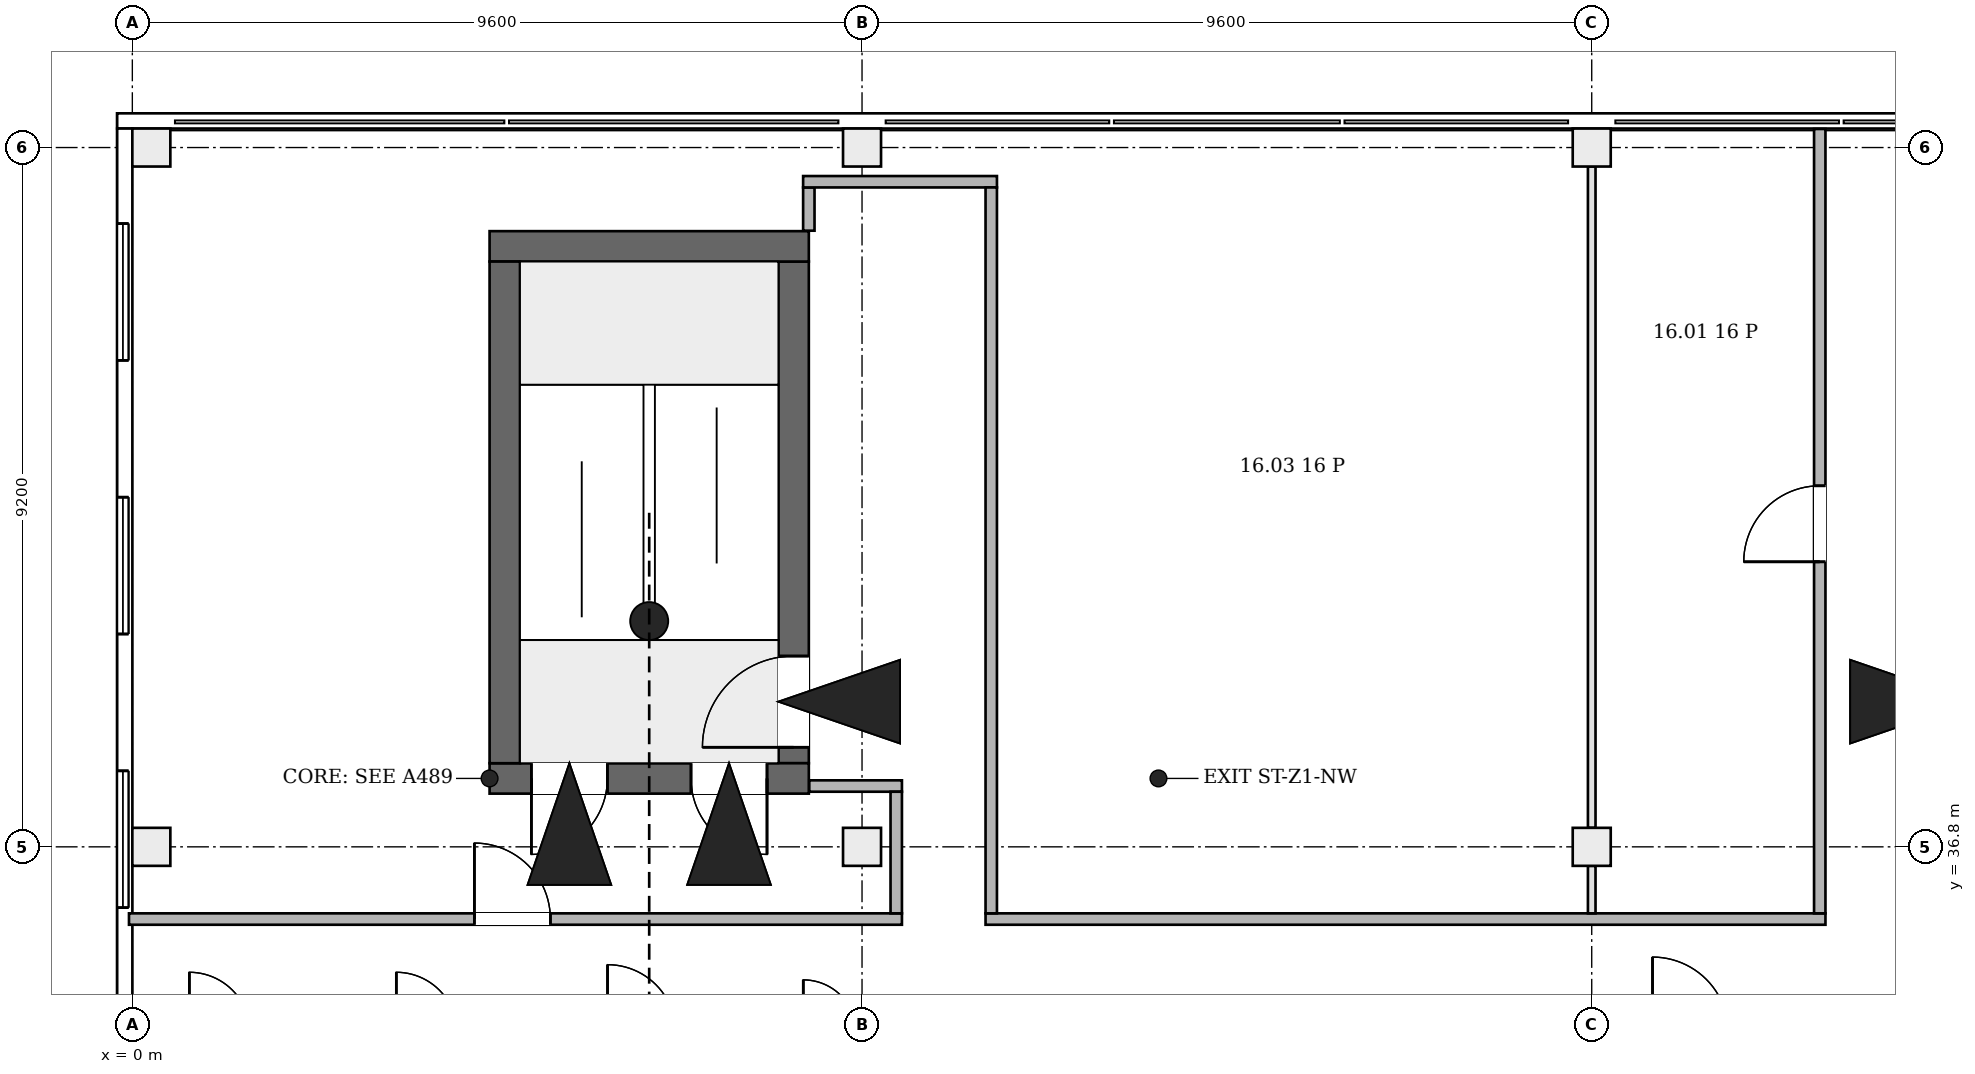
"""IFC4 building model, lengths in metres.
Left out: names, types, materials, properties, quantities, classifications, styles, units other than length and angle.
Written with IfcOpenShell. Run it as: python <this file> out.ifc"""

import sys

from ifc_helpers import new_model, si_unit, direction, frame, frame_2d, origin, origin_2d, place, context, subcontext, project, spatial, rectangle, extrude, element, fill, save


model = new_model("IFC4")
c1 = context("Model", 3, precision=1e-05, world=origin(), true_north=direction((0.0, 1.0)))
c2 = subcontext(c1, "Body", "Model", "MODEL_VIEW")
j1 = project(units=[si_unit("LENGTHUNIT", "METRE"), si_unit("PLANEANGLEUNIT", "RADIAN")], contexts=[c1])
p1 = place(None, origin())
s1 = spatial("IfcSite", under=j1, at=p1, CompositionType="ELEMENT")
p2 = place(p1, origin())
s2 = spatial("IfcBuilding", under=s1, at=p2, CompositionType="ELEMENT")
p3 = place(p2, frame((0.0, 0.0, 78.1)))
s3 = spatial("IfcBuildingStorey", under=s2, at=p3, CompositionType="ELEMENT", Elevation=78.1)
p4 = place(p3, frame((4.7, 37.7, 0.0), z_axis=(0.0, 0.0, 1.0), x_axis=(1.0, 0.0, 0.0)))
e1 = element("IfcWall", 1, at=p4, inside=s3, PredefinedType="SHEAR", context=c2, shape_type="SweptSolid", body=[
    extrude(rectangle(XDim=4.2, YDim=0.4, at=frame_2d((2.1, 0.0))), origin(), (0.0, 0.0, 1.0), 7.1),
])
p5 = place(p4, frame((0.55, 0.0, 4.2)))
e2 = element("IfcOpeningElement", 2, at=p5, cuts=e1, PredefinedType="OPENING", context=c2, shape_type="SweptSolid", body=[
    extrude(rectangle(XDim=1.0, YDim=2.1, at=frame_2d((0.5, 1.05))), frame((0.0, 0.21, 0.0), z_axis=(0.0, -1.0, 0.0), x_axis=(1.0, 0.0, 0.0)), (0.0, 0.0, 1.0), 0.42),
])
p6 = place(p4, frame((2.65, 0.0, 4.2)))
e3 = element("IfcOpeningElement", 3, at=p6, cuts=e1, PredefinedType="OPENING", context=c2, shape_type="SweptSolid", body=[
    extrude(rectangle(XDim=1.0, YDim=2.1, at=frame_2d((0.5, 1.05))), frame((0.0, 0.21, 0.0), z_axis=(0.0, -1.0, 0.0), x_axis=(1.0, 0.0, 0.0)), (0.0, 0.0, 1.0), 0.42),
])
p7 = place(p3, frame((4.7, 44.7, 0.0), z_axis=(0.0, 0.0, 1.0), x_axis=(1.0, 0.0, 0.0)))
e4 = element("IfcWall", 4, at=p7, inside=s3, PredefinedType="SHEAR", context=c2, shape_type="SweptSolid", body=[
    extrude(rectangle(XDim=4.2, YDim=0.4, at=frame_2d((2.1, 0.0))), origin(), (0.0, 0.0, 1.0), 7.1),
])
p8 = place(p3, frame((4.9, 37.9, 0.0), z_axis=(0.0, 0.0, 1.0), x_axis=(0.0, 1.0, 0.0)))
e5 = element("IfcWall", 5, at=p8, inside=s3, PredefinedType="SHEAR", context=c2, shape_type="SweptSolid", body=[
    extrude(rectangle(XDim=6.6, YDim=0.4, at=frame_2d((3.3, 0.0))), origin(), (0.0, 0.0, 1.0), 7.1),
])
p9 = place(p3, frame((8.7, 37.9, 0.0), z_axis=(0.0, 0.0, 1.0), x_axis=(0.0, 1.0, 0.0)))
e6 = element("IfcWall", 6, at=p9, inside=s3, PredefinedType="SHEAR", context=c2, shape_type="SweptSolid", body=[
    extrude(rectangle(XDim=6.6, YDim=0.4, at=frame_2d((3.3, 0.0))), origin(), (0.0, 0.0, 1.0), 7.1),
])
p10 = place(p9, frame((0.21, 0.0, 0.0)))
e7 = element("IfcOpeningElement", 7, at=p10, cuts=e6, PredefinedType="OPENING", context=c2, shape_type="SweptSolid", body=[
    extrude(rectangle(XDim=1.2, YDim=2.1, at=frame_2d((0.6, 1.05))), frame((0.0, 0.21, 0.0), z_axis=(0.0, -1.0, 0.0), x_axis=(1.0, 0.0, 0.0)), (0.0, 0.0, 1.0), 0.42),
])
for number, where, z_axis, x_axis in (
    (8, (0.25, 36.8, 0.0), (0.0, 0.0, 1.0), (1.0, 0.0, 0.0)),
    (9, (9.6, 36.8, 0.0), (0.0, 0.0, 1.0), (1.0, 0.0, 0.0)),
    (10, (19.2, 36.8, 0.0), (0.0, 0.0, 1.0), (1.0, 0.0, 0.0)),
    (11, (0.25, 46.0, 0.0), (0.0, 0.0, 1.0), (1.0, 0.0, 0.0)),
    (12, (9.6, 46.0, 0.0), (0.0, 0.0, 1.0), (1.0, 0.0, 0.0)),
    (13, (19.2, 46.0, 0.0), (0.0, 0.0, 1.0), (1.0, 0.0, 0.0)),
):
    element("IfcColumn", number, at=place(p3, frame(where, z_axis=z_axis, x_axis=x_axis)), inside=s3, PredefinedType="COLUMN", context=c2, shape_type="SweptSolid", body=[
        extrude(rectangle(XDim=0.5, YDim=0.5, at=origin_2d()), origin(), (0.0, 0.0, 1.0), 3.9),
    ])
p11 = place(p3, frame((-0.125, 46.45, 0.0), z_axis=(0.0, 0.0, 1.0), x_axis=(0.0, -1.0, 0.0)))
e14 = element("IfcWall", 14, at=p11, inside=s3, PredefinedType="ELEMENTEDWALL", context=c2, shape_type="SweptSolid", body=[
    extrude(rectangle(XDim=19.3, YDim=0.15, at=frame_2d((9.65, 0.0))), origin(), (0.0, 0.0, 1.0), 3.9),
])
p12 = place(p11, frame((15.85, 0.0, 0.9)))
e15 = element("IfcOpeningElement", 15, at=p12, cuts=e14, PredefinedType="OPENING", context=c2, shape_type="SweptSolid", body=[
    extrude(rectangle(XDim=1.8, YDim=2.6, at=frame_2d((0.9, 1.3))), frame((0.0, 0.085, 0.0), z_axis=(0.0, -1.0, 0.0), x_axis=(1.0, 0.0, 0.0)), (0.0, 0.0, 1.0), 0.17),
])
p13 = place(p11, frame((12.25, 0.0, 0.9)))
e16 = element("IfcOpeningElement", 16, at=p13, cuts=e14, PredefinedType="OPENING", context=c2, shape_type="SweptSolid", body=[
    extrude(rectangle(XDim=1.8, YDim=2.6, at=frame_2d((0.9, 1.3))), frame((0.0, 0.085, 0.0), z_axis=(0.0, -1.0, 0.0), x_axis=(1.0, 0.0, 0.0)), (0.0, 0.0, 1.0), 0.17),
])
p14 = place(p11, frame((8.65, 0.0, 0.9)))
e17 = element("IfcOpeningElement", 17, at=p14, cuts=e14, PredefinedType="OPENING", context=c2, shape_type="SweptSolid", body=[
    extrude(rectangle(XDim=1.8, YDim=2.6, at=frame_2d((0.9, 1.3))), frame((0.0, 0.085, 0.0), z_axis=(0.0, -1.0, 0.0), x_axis=(1.0, 0.0, 0.0)), (0.0, 0.0, 1.0), 0.17),
])
p15 = place(p11, frame((5.05, 0.0, 0.9)))
e18 = element("IfcOpeningElement", 18, at=p15, cuts=e14, PredefinedType="OPENING", context=c2, shape_type="SweptSolid", body=[
    extrude(rectangle(XDim=1.8, YDim=2.6, at=frame_2d((0.9, 1.3))), frame((0.0, 0.085, 0.0), z_axis=(0.0, -1.0, 0.0), x_axis=(1.0, 0.0, 0.0)), (0.0, 0.0, 1.0), 0.17),
])
p16 = place(p11, frame((1.45, 0.0, 0.9)))
e19 = element("IfcOpeningElement", 19, at=p16, cuts=e14, PredefinedType="OPENING", context=c2, shape_type="SweptSolid", body=[
    extrude(rectangle(XDim=1.8, YDim=2.6, at=frame_2d((0.9, 1.3))), frame((0.0, 0.085, 0.0), z_axis=(0.0, -1.0, 0.0), x_axis=(1.0, 0.0, 0.0)), (0.0, 0.0, 1.0), 0.17),
])
p17 = place(p3, frame((38.851, 46.35, 4.2), z_axis=(0.0, 0.0, 1.0), x_axis=(-1.0, 0.0, 0.0)))
e20 = element("IfcWall", 20, at=p17, inside=s3, PredefinedType="PARAPET", context=c2, shape_type="SweptSolid", body=[
    extrude(rectangle(XDim=39.05, YDim=0.2, at=frame_2d((19.525, 0.0))), origin(), (0.0, 0.0, 1.0), 1.1),
])
p18 = place(p3, frame((-0.099, 46.25, 4.2), z_axis=(0.0, 0.0, 1.0), x_axis=(0.0, -1.0, 0.0)))
e21 = element("IfcWall", 21, at=p18, inside=s3, PredefinedType="PARAPET", context=c2, shape_type="SweptSolid", body=[
    extrude(rectangle(XDim=18.9, YDim=0.2, at=frame_2d((9.45, 0.0))), origin(), (0.0, 0.0, 1.0), 1.1),
])
p19 = place(p3, frame((-0.044, 35.85, 0.0), z_axis=(0.0, 0.0, 1.0), x_axis=(1.0, 0.0, 0.0)))
e22 = element("IfcWall", 22, at=p19, inside=s3, PredefinedType="PARTITIONING", context=c2, shape_type="SweptSolid", body=[
    extrude(rectangle(XDim=10.169, YDim=0.15, at=frame_2d((5.084, 0.0))), origin(), (0.0, 0.0, 1.0), 3.9),
])
p20 = place(p19, frame((4.544, 0.0, 0.0)))
e23 = element("IfcOpeningElement", 23, at=p20, cuts=e22, PredefinedType="OPENING", context=c2, shape_type="SweptSolid", body=[
    extrude(rectangle(XDim=1.0, YDim=2.1, at=frame_2d((0.5, 1.05))), frame((0.0, 0.085, 0.0), z_axis=(0.0, -1.0, 0.0), x_axis=(1.0, 0.0, 0.0)), (0.0, 0.0, 1.0), 0.17),
])
p21 = place(p3, frame((8.9, 44.906, 0.0), z_axis=(0.0, 0.0, 1.0), x_axis=(0.0, 1.0, 0.0)))
e24 = element("IfcWall", 24, at=p21, inside=s3, PredefinedType="PARTITIONING", context=c2, shape_type="SweptSolid", body=[
    extrude(rectangle(XDim=0.569, YDim=0.15, at=frame_2d((0.285, 0.0))), origin(), (0.0, 0.0, 1.0), 3.9),
])
p22 = place(p3, frame((8.825, 45.55, 0.0), z_axis=(0.0, 0.0, 1.0), x_axis=(1.0, 0.0, 0.0)))
e25 = element("IfcWall", 25, at=p22, inside=s3, PredefinedType="PARTITIONING", context=c2, shape_type="SweptSolid", body=[
    extrude(rectangle(XDim=2.55, YDim=0.15, at=frame_2d((1.275, 0.0))), origin(), (0.0, 0.0, 1.0), 3.9),
])
p23 = place(p3, frame((8.906, 37.6, 0.0), z_axis=(0.0, 0.0, 1.0), x_axis=(1.0, 0.0, 0.0)))
e26 = element("IfcWall", 26, at=p23, inside=s3, PredefinedType="PARTITIONING", context=c2, shape_type="SweptSolid", body=[
    extrude(rectangle(XDim=1.219, YDim=0.15, at=frame_2d((0.609, 0.0))), origin(), (0.0, 0.0, 1.0), 3.9),
])
p24 = place(p3, frame((10.05, 35.925, 0.0), z_axis=(0.0, 0.0, 1.0), x_axis=(0.0, 1.0, 0.0)))
e27 = element("IfcWall", 27, at=p24, inside=s3, PredefinedType="PARTITIONING", context=c2, shape_type="SweptSolid", body=[
    extrude(rectangle(XDim=1.6, YDim=0.15, at=frame_2d((0.8, 0.0))), origin(), (0.0, 0.0, 1.0), 3.9),
])
p25 = place(p3, frame((11.225, 35.85, 0.0), z_axis=(0.0, 0.0, 1.0), x_axis=(1.0, 0.0, 0.0)))
e28 = element("IfcWall", 28, at=p25, inside=s3, PredefinedType="PARTITIONING", context=c2, shape_type="SweptSolid", body=[
    extrude(rectangle(XDim=11.05, YDim=0.15, at=frame_2d((5.525, 0.0))), origin(), (0.0, 0.0, 1.0), 3.9),
])
p26 = place(p3, frame((11.3, 35.925, 0.0), z_axis=(0.0, 0.0, 1.0), x_axis=(0.0, 1.0, 0.0)))
e29 = element("IfcWall", 29, at=p26, inside=s3, PredefinedType="PARTITIONING", context=c2, shape_type="SweptSolid", body=[
    extrude(rectangle(XDim=9.55, YDim=0.15, at=frame_2d((4.775, 0.0))), origin(), (0.0, 0.0, 1.0), 3.9),
])
p27 = place(p3, frame((19.2, 35.925, 0.0), z_axis=(0.0, 0.0, 1.0), x_axis=(0.0, 1.0, 0.0)))
e30 = element("IfcWall", 30, at=p27, inside=s3, PredefinedType="PARTITIONING", context=c2, shape_type="SweptSolid", body=[
    extrude(rectangle(XDim=0.625, YDim=0.1, at=frame_2d((0.312, 0.0))), origin(), (0.0, 0.0, 1.0), 3.9),
])
p28 = place(p3, frame((19.2, 37.05, 0.0), z_axis=(0.0, 0.0, 1.0), x_axis=(0.0, 1.0, 0.0)))
e31 = element("IfcWall", 31, at=p28, inside=s3, PredefinedType="PARTITIONING", context=c2, shape_type="SweptSolid", body=[
    extrude(rectangle(XDim=8.7, YDim=0.1, at=frame_2d((4.35, 0.0))), origin(), (0.0, 0.0, 1.0), 3.9),
])
p29 = place(p3, frame((22.2, 35.925, 0.0), z_axis=(0.0, 0.0, 1.0), x_axis=(0.0, 1.0, 0.0)))
e32 = element("IfcWall", 32, at=p29, inside=s3, PredefinedType="PARTITIONING", context=c2, shape_type="SweptSolid", body=[
    extrude(rectangle(XDim=10.319, YDim=0.15, at=frame_2d((5.159, 0.0))), origin(), (0.0, 0.0, 1.0), 3.9),
])
p30 = place(p29, frame((4.625, 0.0, 0.0)))
e33 = element("IfcOpeningElement", 33, at=p30, cuts=e32, PredefinedType="OPENING", context=c2, shape_type="SweptSolid", body=[
    extrude(rectangle(XDim=1.0, YDim=2.1, at=frame_2d((0.5, 1.05))), frame((0.0, 0.085, 0.0), z_axis=(0.0, -1.0, 0.0), x_axis=(1.0, 0.0, 0.0)), (0.0, 0.0, 1.0), 0.17),
])
p31 = place(p14, origin())
e34 = element("IfcWindow", 34, at=p31, inside=s3, PartitioningType="SINGLE_PANEL", PredefinedType="WINDOW", context=c2, shape_type="SweptSolid", body=[
    extrude(rectangle(XDim=1.8, YDim=2.6, at=frame_2d((0.9, 1.3))), frame((0.0, 0.03, 0.0), z_axis=(0.0, -1.0, 0.0), x_axis=(1.0, 0.0, 0.0)), (0.0, 0.0, 1.0), 0.06),
])
fill(e17, e34)
p32 = place(p15, origin())
e35 = element("IfcWindow", 35, at=p32, inside=s3, PartitioningType="SINGLE_PANEL", PredefinedType="WINDOW", context=c2, shape_type="SweptSolid", body=[
    extrude(rectangle(XDim=1.8, YDim=2.6, at=frame_2d((0.9, 1.3))), frame((0.0, 0.03, 0.0), z_axis=(0.0, -1.0, 0.0), x_axis=(1.0, 0.0, 0.0)), (0.0, 0.0, 1.0), 0.06),
])
fill(e18, e35)
p33 = place(p16, origin())
e36 = element("IfcWindow", 36, at=p33, inside=s3, PartitioningType="SINGLE_PANEL", PredefinedType="WINDOW", context=c2, shape_type="SweptSolid", body=[
    extrude(rectangle(XDim=1.8, YDim=2.6, at=frame_2d((0.9, 1.3))), frame((0.0, 0.03, 0.0), z_axis=(0.0, -1.0, 0.0), x_axis=(1.0, 0.0, 0.0)), (0.0, 0.0, 1.0), 0.06),
])
fill(e19, e36)
p34 = place(p10, origin())
e37 = element("IfcDoor", 37, at=p34, inside=s3, OperationType="SINGLE_SWING_RIGHT", PredefinedType="DOOR", context=c2, shape_type="SweptSolid", body=[
    extrude(rectangle(XDim=1.2, YDim=2.1, at=frame_2d((0.6, 1.05))), frame((0.0, 0.025, 0.0), z_axis=(0.0, -1.0, 0.0), x_axis=(1.0, 0.0, 0.0)), (0.0, 0.0, 1.0), 0.05),
])
fill(e7, e37)
p35 = place(p5, frame((1.0, 0.0, 0.0), z_axis=(0.0, 0.0, 1.0), x_axis=(-1.0, 0.0, 0.0)))
e38 = element("IfcDoor", 38, at=p35, inside=s3, OperationType="SINGLE_SWING_LEFT", PredefinedType="DOOR", context=c2, shape_type="SweptSolid", body=[
    extrude(rectangle(XDim=1.0, YDim=2.1, at=frame_2d((0.5, 1.05))), frame((0.0, 0.025, 0.0), z_axis=(0.0, -1.0, 0.0), x_axis=(1.0, 0.0, 0.0)), (0.0, 0.0, 1.0), 0.05),
])
fill(e2, e38)
p36 = place(p6, frame((1.0, 0.0, 0.0), z_axis=(0.0, 0.0, 1.0), x_axis=(-1.0, 0.0, 0.0)))
e39 = element("IfcDoor", 39, at=p36, inside=s3, OperationType="SINGLE_SWING_RIGHT", PredefinedType="DOOR", context=c2, shape_type="SweptSolid", body=[
    extrude(rectangle(XDim=1.0, YDim=2.1, at=frame_2d((0.5, 1.05))), frame((0.0, 0.025, 0.0), z_axis=(0.0, -1.0, 0.0), x_axis=(1.0, 0.0, 0.0)), (0.0, 0.0, 1.0), 0.05),
])
fill(e3, e39)
p37 = place(p20, origin())
e40 = element("IfcDoor", 40, at=p37, inside=s3, OperationType="SINGLE_SWING_LEFT", PredefinedType="DOOR", context=c2, shape_type="SweptSolid", body=[
    extrude(rectangle(XDim=1.0, YDim=2.1, at=frame_2d((0.5, 1.05))), frame((0.0, 0.025, 0.0), z_axis=(0.0, -1.0, 0.0), x_axis=(1.0, 0.0, 0.0)), (0.0, 0.0, 1.0), 0.05),
])
fill(e23, e40)
p38 = place(p30, origin())
e41 = element("IfcDoor", 41, at=p38, inside=s3, OperationType="SINGLE_SWING_RIGHT", PredefinedType="DOOR", context=c2, shape_type="SweptSolid", body=[
    extrude(rectangle(XDim=1.0, YDim=2.1, at=frame_2d((0.5, 1.05))), frame((0.0, 0.025, 0.0), z_axis=(0.0, -1.0, 0.0), x_axis=(1.0, 0.0, 0.0)), (0.0, 0.0, 1.0), 0.05),
])
fill(e33, e41)
save(model, sys.argv[1])
